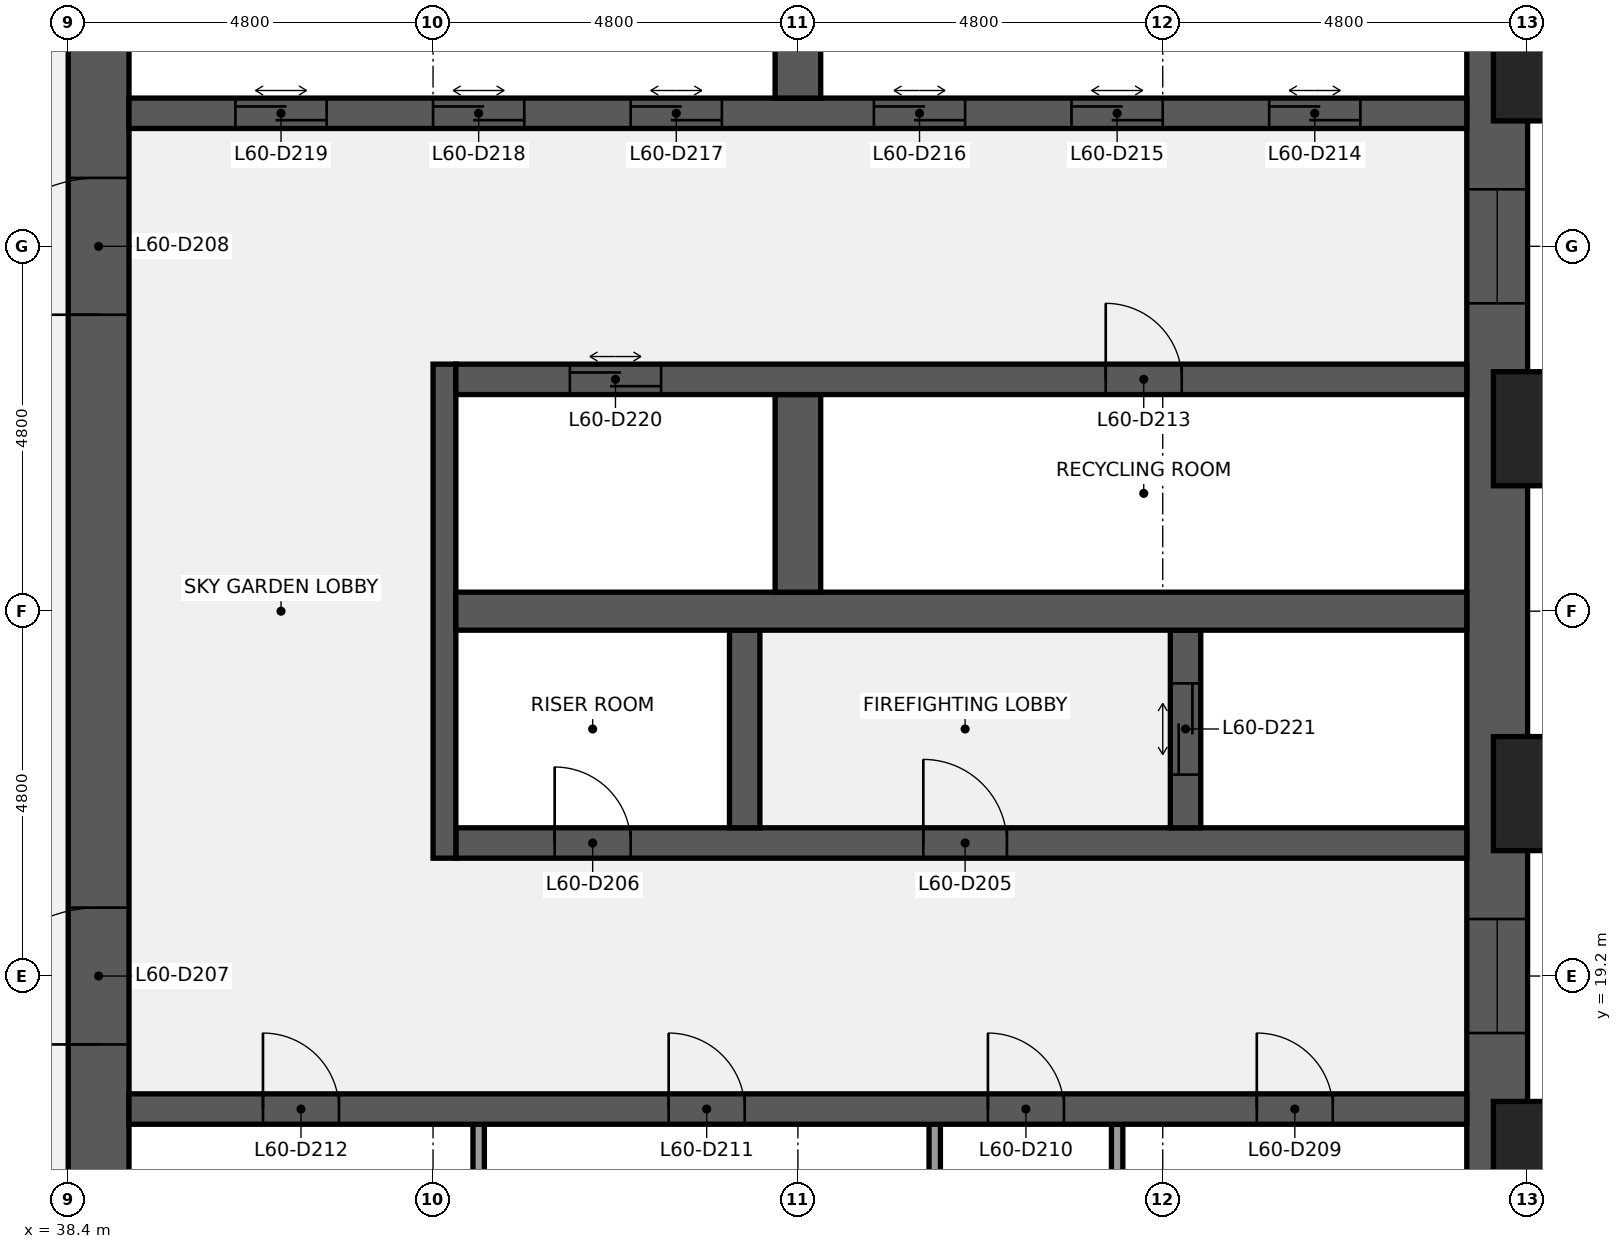
"""IFC4 building model, lengths in metres.
Left out: names, types, materials, properties, quantities, classifications, styles, units other than length and angle.
Written with IfcOpenShell. Run it as: python <this file> out.ifc"""

import sys

from ifc_helpers import new_model, si_unit, direction, frame, frame_2d, origin, origin_2d, place, context, subcontext, project, spatial, rectangle, extrude, element, fill, save


model = new_model("IFC4")
c1 = context("Model", 3, precision=1e-05, world=origin(), true_north=direction((0.0, 1.0)))
c2 = subcontext(c1, "Body", "Model", "MODEL_VIEW")
j1 = project(units=[si_unit("LENGTHUNIT", "METRE"), si_unit("PLANEANGLEUNIT", "RADIAN")], contexts=[c1])
p1 = place(None, origin())
s1 = spatial("IfcSite", under=j1, at=p1, CompositionType="ELEMENT")
p2 = place(p1, origin())
s2 = spatial("IfcBuilding", under=s1, at=p2, CompositionType="ELEMENT")
p3 = place(p2, frame((0.0, 0.0, 269.7)))
s3 = spatial("IfcBuildingStorey", under=s2, at=p3, CompositionType="ELEMENT", Elevation=269.7)
p4 = place(p3, frame((57.2, 38.4, 0.0), z_axis=(0.0, 0.0, 1.0), x_axis=(0.0, -1.0, 0.0)))
e1 = element("IfcWall", 1, at=p4, inside=s3, PredefinedType="SHEAR", context=c2, shape_type="SweptSolid", body=[
    extrude(rectangle(XDim=28.8, YDim=0.8, at=frame_2d((14.4, 0.0))), origin(), (0.0, 0.0, 1.0), 12.3),
])
p5 = place(p4, frame((18.45, 0.0, 0.9)))
e2 = element("IfcOpeningElement", 2, at=p5, cuts=e1, PredefinedType="OPENING", context=c2, shape_type="SweptSolid", body=[
    extrude(rectangle(XDim=1.5, YDim=6.3, at=frame_2d((0.75, 3.15))), frame((0.0, 0.41, 0.0), z_axis=(0.0, -1.0, 0.0), x_axis=(1.0, 0.0, 0.0)), (0.0, 0.0, 1.0), 0.82),
])
p6 = place(p4, frame((8.85, 0.0, 0.9)))
e3 = element("IfcOpeningElement", 3, at=p6, cuts=e1, PredefinedType="OPENING", context=c2, shape_type="SweptSolid", body=[
    extrude(rectangle(XDim=1.5, YDim=6.3, at=frame_2d((0.75, 3.15))), frame((0.0, 0.41, 0.0), z_axis=(0.0, -1.0, 0.0), x_axis=(1.0, 0.0, 0.0)), (0.0, 0.0, 1.0), 0.82),
])
p7 = place(p3, frame((38.8, 9.6, 0.0), z_axis=(0.0, 0.0, 1.0), x_axis=(0.0, 1.0, 0.0)))
e4 = element("IfcWall", 4, at=p7, inside=s3, PredefinedType="SHEAR", context=c2, shape_type="SweptSolid", body=[
    extrude(rectangle(XDim=28.8, YDim=0.8, at=frame_2d((14.4, 0.0))), origin(), (0.0, 0.0, 1.0), 12.3),
])
p8 = place(p7, frame((8.7, 0.0, 0.0)))
e5 = element("IfcOpeningElement", 5, at=p8, cuts=e4, PredefinedType="OPENING", context=c2, shape_type="SweptSolid", body=[
    extrude(rectangle(XDim=1.8, YDim=2.1, at=frame_2d((0.9, 1.05))), frame((0.0, 0.41, 0.0), z_axis=(0.0, -1.0, 0.0), x_axis=(1.0, 0.0, 0.0)), (0.0, 0.0, 1.0), 0.82),
])
p9 = place(p7, frame((18.3, 0.0, 0.0)))
e6 = element("IfcOpeningElement", 6, at=p9, cuts=e4, PredefinedType="OPENING", context=c2, shape_type="SweptSolid", body=[
    extrude(rectangle(XDim=1.8, YDim=2.1, at=frame_2d((0.9, 1.05))), frame((0.0, 0.41, 0.0), z_axis=(0.0, -1.0, 0.0), x_axis=(1.0, 0.0, 0.0)), (0.0, 0.0, 1.0), 0.82),
])
for number, where, z_axis, x_axis in (
    (7, (52.2, 14.65, 0.0), (0.0, 0.0, 1.0), (0.0, 1.0, 0.0)),
    (8, (49.8, 14.65, 0.0), (0.0, 0.0, 1.0), (0.0, 1.0, 0.0)),
    (9, (43.8, 14.65, 0.0), (0.0, 0.0, 1.0), (0.0, 1.0, 0.0)),
):
    element("IfcWall", number, at=place(p3, frame(where, z_axis=z_axis, x_axis=x_axis)), inside=s3, PredefinedType="PARTITIONING", context=c2, shape_type="SweptSolid", body=[
        extrude(rectangle(XDim=2.6, YDim=0.15, at=frame_2d((1.3, 0.0))), origin(), (0.0, 0.0, 1.0), 12.3),
    ])
p10 = place(p3, frame((39.2, 17.45, 0.0), z_axis=(0.0, 0.0, 1.0), x_axis=(1.0, 0.0, 0.0)))
e10 = element("IfcWall", 10, at=p10, inside=s3, PredefinedType="SHEAR", context=c2, shape_type="SweptSolid", body=[
    extrude(rectangle(XDim=17.6, YDim=0.4, at=frame_2d((8.8, 0.0))), origin(), (0.0, 0.0, 1.0), 12.3),
])
p11 = place(p10, frame((14.837, 0.0, 0.0)))
e11 = element("IfcOpeningElement", 11, at=p11, cuts=e10, PredefinedType="OPENING", context=c2, shape_type="SweptSolid", body=[
    extrude(rectangle(XDim=1.0, YDim=2.1, at=frame_2d((0.5, 1.05))), frame((0.0, 0.21, 0.0), z_axis=(0.0, -1.0, 0.0), x_axis=(1.0, 0.0, 0.0)), (0.0, 0.0, 1.0), 0.42),
])
p12 = place(p10, frame((11.3, 0.0, 0.0)))
e12 = element("IfcOpeningElement", 12, at=p12, cuts=e10, PredefinedType="OPENING", context=c2, shape_type="SweptSolid", body=[
    extrude(rectangle(XDim=1.0, YDim=2.1, at=frame_2d((0.5, 1.05))), frame((0.0, 0.21, 0.0), z_axis=(0.0, -1.0, 0.0), x_axis=(1.0, 0.0, 0.0)), (0.0, 0.0, 1.0), 0.42),
])
p13 = place(p10, frame((7.1, 0.0, 0.0)))
e13 = element("IfcOpeningElement", 13, at=p13, cuts=e10, PredefinedType="OPENING", context=c2, shape_type="SweptSolid", body=[
    extrude(rectangle(XDim=1.0, YDim=2.1, at=frame_2d((0.5, 1.05))), frame((0.0, 0.21, 0.0), z_axis=(0.0, -1.0, 0.0), x_axis=(1.0, 0.0, 0.0)), (0.0, 0.0, 1.0), 0.42),
])
p14 = place(p10, frame((1.762, 0.0, 0.0)))
e14 = element("IfcOpeningElement", 14, at=p14, cuts=e10, PredefinedType="OPENING", context=c2, shape_type="SweptSolid", body=[
    extrude(rectangle(XDim=1.0, YDim=2.1, at=frame_2d((0.5, 1.05))), frame((0.0, 0.21, 0.0), z_axis=(0.0, -1.0, 0.0), x_axis=(1.0, 0.0, 0.0)), (0.0, 0.0, 1.0), 0.42),
])
p15 = place(p3, frame((43.5, 20.95, 0.0), z_axis=(0.0, 0.0, 1.0), x_axis=(1.0, 0.0, 0.0)))
e15 = element("IfcWall", 15, at=p15, inside=s3, PredefinedType="SHEAR", context=c2, shape_type="SweptSolid", body=[
    extrude(rectangle(XDim=13.3, YDim=0.4, at=frame_2d((6.65, 0.0))), origin(), (0.0, 0.0, 1.0), 12.3),
])
p16 = place(p15, frame((6.15, 0.0, 0.0)))
e16 = element("IfcOpeningElement", 16, at=p16, cuts=e15, PredefinedType="OPENING", context=c2, shape_type="SweptSolid", body=[
    extrude(rectangle(XDim=1.1, YDim=2.1, at=frame_2d((0.55, 1.05))), frame((0.0, 0.21, 0.0), z_axis=(0.0, -1.0, 0.0), x_axis=(1.0, 0.0, 0.0)), (0.0, 0.0, 1.0), 0.42),
])
p17 = place(p15, frame((1.3, 0.0, 0.0)))
e17 = element("IfcOpeningElement", 17, at=p17, cuts=e15, PredefinedType="OPENING", context=c2, shape_type="SweptSolid", body=[
    extrude(rectangle(XDim=1.0, YDim=2.1, at=frame_2d((0.5, 1.05))), frame((0.0, 0.21, 0.0), z_axis=(0.0, -1.0, 0.0), x_axis=(1.0, 0.0, 0.0)), (0.0, 0.0, 1.0), 0.42),
])
p18 = place(p3, frame((43.35, 20.75, 0.0), z_axis=(0.0, 0.0, 1.0), x_axis=(0.0, 1.0, 0.0)))
e18 = element("IfcWall", 18, at=p18, inside=s3, PredefinedType="SHEAR", context=c2, shape_type="SweptSolid", body=[
    extrude(rectangle(XDim=6.5, YDim=0.3, at=frame_2d((3.25, 0.0))), origin(), (0.0, 0.0, 1.0), 12.3),
])
p19 = place(p3, frame((53.1, 21.15, 0.0), z_axis=(0.0, 0.0, 1.0), x_axis=(0.0, 1.0, 0.0)))
e19 = element("IfcWall", 19, at=p19, inside=s3, PredefinedType="SHEAR", context=c2, shape_type="SweptSolid", body=[
    extrude(rectangle(XDim=2.6, YDim=0.4, at=frame_2d((1.3, 0.0))), origin(), (0.0, 0.0, 1.0), 12.3),
])
p20 = place(p19, frame((0.7, 0.0, 0.0)))
e20 = element("IfcOpeningElement", 20, at=p20, cuts=e19, PredefinedType="OPENING", context=c2, shape_type="SweptSolid", body=[
    extrude(rectangle(XDim=1.2, YDim=2.1, at=frame_2d((0.6, 1.05))), frame((0.0, 0.21, 0.0), z_axis=(0.0, -1.0, 0.0), x_axis=(1.0, 0.0, 0.0)), (0.0, 0.0, 1.0), 0.42),
])
p21 = place(p3, frame((47.3, 21.15, 0.0), z_axis=(0.0, 0.0, 1.0), x_axis=(0.0, 1.0, 0.0)))
e21 = element("IfcWall", 21, at=p21, inside=s3, PredefinedType="SHEAR", context=c2, shape_type="SweptSolid", body=[
    extrude(rectangle(XDim=2.6, YDim=0.4, at=frame_2d((1.3, 0.0))), origin(), (0.0, 0.0, 1.0), 12.3),
])
p22 = place(p3, frame((43.5, 24.0, 0.0), z_axis=(0.0, 0.0, 1.0), x_axis=(1.0, 0.0, 0.0)))
e22 = element("IfcWall", 22, at=p22, inside=s3, PredefinedType="SHEAR", context=c2, shape_type="SweptSolid", body=[
    extrude(rectangle(XDim=13.3, YDim=0.5, at=frame_2d((6.65, 0.0))), origin(), (0.0, 0.0, 1.0), 12.3),
])
p23 = place(p3, frame((48.0, 24.25, 0.0), z_axis=(0.0, 0.0, 1.0), x_axis=(0.0, 1.0, 0.0)))
e23 = element("IfcWall", 23, at=p23, inside=s3, PredefinedType="SHEAR", context=c2, shape_type="SweptSolid", body=[
    extrude(rectangle(XDim=2.6, YDim=0.6, at=frame_2d((1.3, 0.0))), origin(), (0.0, 0.0, 1.0), 12.3),
])
p24 = place(p3, frame((43.5, 27.05, 0.0), z_axis=(0.0, 0.0, 1.0), x_axis=(1.0, 0.0, 0.0)))
e24 = element("IfcWall", 24, at=p24, inside=s3, PredefinedType="SHEAR", context=c2, shape_type="SweptSolid", body=[
    extrude(rectangle(XDim=13.3, YDim=0.4, at=frame_2d((6.65, 0.0))), origin(), (0.0, 0.0, 1.0), 12.3),
])
p25 = place(p24, frame((8.55, 0.0, 0.0)))
e25 = element("IfcOpeningElement", 25, at=p25, cuts=e24, PredefinedType="OPENING", context=c2, shape_type="SweptSolid", body=[
    extrude(rectangle(XDim=1.0, YDim=2.1, at=frame_2d((0.5, 1.05))), frame((0.0, 0.21, 0.0), z_axis=(0.0, -1.0, 0.0), x_axis=(1.0, 0.0, 0.0)), (0.0, 0.0, 1.0), 0.42),
])
p26 = place(p24, frame((1.5, 0.0, 0.0)))
e26 = element("IfcOpeningElement", 26, at=p26, cuts=e24, PredefinedType="OPENING", context=c2, shape_type="SweptSolid", body=[
    extrude(rectangle(XDim=1.2, YDim=2.1, at=frame_2d((0.6, 1.05))), frame((0.0, 0.21, 0.0), z_axis=(0.0, -1.0, 0.0), x_axis=(1.0, 0.0, 0.0)), (0.0, 0.0, 1.0), 0.42),
])
p27 = place(p3, frame((39.2, 30.55, 0.0), z_axis=(0.0, 0.0, 1.0), x_axis=(1.0, 0.0, 0.0)))
e27 = element("IfcWall", 27, at=p27, inside=s3, PredefinedType="SHEAR", context=c2, shape_type="SweptSolid", body=[
    extrude(rectangle(XDim=17.6, YDim=0.4, at=frame_2d((8.8, 0.0))), origin(), (0.0, 0.0, 1.0), 12.3),
])
p28 = place(p27, frame((15.0, 0.0, 0.0)))
e28 = element("IfcOpeningElement", 28, at=p28, cuts=e27, PredefinedType="OPENING", context=c2, shape_type="SweptSolid", body=[
    extrude(rectangle(XDim=1.2, YDim=2.1, at=frame_2d((0.6, 1.05))), frame((0.0, 0.21, 0.0), z_axis=(0.0, -1.0, 0.0), x_axis=(1.0, 0.0, 0.0)), (0.0, 0.0, 1.0), 0.42),
])
p29 = place(p27, frame((12.4, 0.0, 0.0)))
e29 = element("IfcOpeningElement", 29, at=p29, cuts=e27, PredefinedType="OPENING", context=c2, shape_type="SweptSolid", body=[
    extrude(rectangle(XDim=1.2, YDim=2.1, at=frame_2d((0.6, 1.05))), frame((0.0, 0.21, 0.0), z_axis=(0.0, -1.0, 0.0), x_axis=(1.0, 0.0, 0.0)), (0.0, 0.0, 1.0), 0.42),
])
p30 = place(p27, frame((9.8, 0.0, 0.0)))
e30 = element("IfcOpeningElement", 30, at=p30, cuts=e27, PredefinedType="OPENING", context=c2, shape_type="SweptSolid", body=[
    extrude(rectangle(XDim=1.2, YDim=2.1, at=frame_2d((0.6, 1.05))), frame((0.0, 0.21, 0.0), z_axis=(0.0, -1.0, 0.0), x_axis=(1.0, 0.0, 0.0)), (0.0, 0.0, 1.0), 0.42),
])
p31 = place(p27, frame((6.6, 0.0, 0.0)))
e31 = element("IfcOpeningElement", 31, at=p31, cuts=e27, PredefinedType="OPENING", context=c2, shape_type="SweptSolid", body=[
    extrude(rectangle(XDim=1.2, YDim=2.1, at=frame_2d((0.6, 1.05))), frame((0.0, 0.21, 0.0), z_axis=(0.0, -1.0, 0.0), x_axis=(1.0, 0.0, 0.0)), (0.0, 0.0, 1.0), 0.42),
])
p32 = place(p27, frame((4.0, 0.0, 0.0)))
e32 = element("IfcOpeningElement", 32, at=p32, cuts=e27, PredefinedType="OPENING", context=c2, shape_type="SweptSolid", body=[
    extrude(rectangle(XDim=1.2, YDim=2.1, at=frame_2d((0.6, 1.05))), frame((0.0, 0.21, 0.0), z_axis=(0.0, -1.0, 0.0), x_axis=(1.0, 0.0, 0.0)), (0.0, 0.0, 1.0), 0.42),
])
p33 = place(p27, frame((1.4, 0.0, 0.0)))
e33 = element("IfcOpeningElement", 33, at=p33, cuts=e27, PredefinedType="OPENING", context=c2, shape_type="SweptSolid", body=[
    extrude(rectangle(XDim=1.2, YDim=2.1, at=frame_2d((0.6, 1.05))), frame((0.0, 0.21, 0.0), z_axis=(0.0, -1.0, 0.0), x_axis=(1.0, 0.0, 0.0)), (0.0, 0.0, 1.0), 0.42),
])
p34 = place(p3, frame((48.0, 30.75, 0.0), z_axis=(0.0, 0.0, 1.0), x_axis=(0.0, 1.0, 0.0)))
e34 = element("IfcWall", 34, at=p34, inside=s3, PredefinedType="SHEAR", context=c2, shape_type="SweptSolid", body=[
    extrude(rectangle(XDim=2.6, YDim=0.6, at=frame_2d((1.3, 0.0))), origin(), (0.0, 0.0, 1.0), 12.3),
])
for number, where, z_axis, x_axis in (
    (35, (58.35, 16.8, 0.0), (0.0, 0.0, 1.0), (0.0, 1.0, 0.0)),
    (36, (58.35, 21.6, 0.0), (0.0, 0.0, 1.0), (0.0, 1.0, 0.0)),
    (37, (58.35, 26.4, 0.0), (0.0, 0.0, 1.0), (0.0, 1.0, 0.0)),
    (38, (58.35, 31.2, 0.0), (0.0, 0.0, 1.0), (0.0, 1.0, 0.0)),
):
    element("IfcColumn", number, at=place(p3, frame(where, z_axis=z_axis, x_axis=x_axis)), inside=s3, PredefinedType="PILASTER", context=c2, shape_type="SweptSolid", body=[
        extrude(rectangle(XDim=2.4, YDim=1.5, at=origin_2d()), origin(), (0.0, 0.0, 1.0), 12.6),
    ])
p35 = place(p16, origin())
e39 = element("IfcDoor", 39, at=p35, inside=s3, OperationType="SINGLE_SWING_LEFT", PredefinedType="DOOR", context=c2, shape_type="SweptSolid", body=[
    extrude(rectangle(XDim=1.1, YDim=2.1, at=frame_2d((0.55, 1.05))), frame((0.0, 0.025, 0.0), z_axis=(0.0, -1.0, 0.0), x_axis=(1.0, 0.0, 0.0)), (0.0, 0.0, 1.0), 0.05),
])
fill(e16, e39)
p36 = place(p17, origin())
e40 = element("IfcDoor", 40, at=p36, inside=s3, OperationType="SINGLE_SWING_LEFT", PredefinedType="DOOR", context=c2, shape_type="SweptSolid", body=[
    extrude(rectangle(XDim=1.0, YDim=2.1, at=frame_2d((0.5, 1.05))), frame((0.0, 0.025, 0.0), z_axis=(0.0, -1.0, 0.0), x_axis=(1.0, 0.0, 0.0)), (0.0, 0.0, 1.0), 0.05),
])
fill(e17, e40)
p37 = place(p8, origin())
e41 = element("IfcDoor", 41, at=p37, inside=s3, OperationType="DOUBLE_DOOR_SINGLE_SWING", PredefinedType="DOOR", context=c2, shape_type="SweptSolid", body=[
    extrude(rectangle(XDim=1.8, YDim=2.1, at=frame_2d((0.9, 1.05))), frame((0.0, 0.025, 0.0), z_axis=(0.0, -1.0, 0.0), x_axis=(1.0, 0.0, 0.0)), (0.0, 0.0, 1.0), 0.05),
])
fill(e5, e41)
p38 = place(p9, origin())
e42 = element("IfcDoor", 42, at=p38, inside=s3, OperationType="DOUBLE_DOOR_SINGLE_SWING", PredefinedType="DOOR", context=c2, shape_type="SweptSolid", body=[
    extrude(rectangle(XDim=1.8, YDim=2.1, at=frame_2d((0.9, 1.05))), frame((0.0, 0.025, 0.0), z_axis=(0.0, -1.0, 0.0), x_axis=(1.0, 0.0, 0.0)), (0.0, 0.0, 1.0), 0.05),
])
fill(e6, e42)
p39 = place(p11, origin())
e43 = element("IfcDoor", 43, at=p39, inside=s3, OperationType="SINGLE_SWING_LEFT", PredefinedType="DOOR", context=c2, shape_type="SweptSolid", body=[
    extrude(rectangle(XDim=1.0, YDim=2.1, at=frame_2d((0.5, 1.05))), frame((0.0, 0.025, 0.0), z_axis=(0.0, -1.0, 0.0), x_axis=(1.0, 0.0, 0.0)), (0.0, 0.0, 1.0), 0.05),
])
fill(e11, e43)
p40 = place(p12, origin())
e44 = element("IfcDoor", 44, at=p40, inside=s3, OperationType="SINGLE_SWING_LEFT", PredefinedType="DOOR", context=c2, shape_type="SweptSolid", body=[
    extrude(rectangle(XDim=1.0, YDim=2.1, at=frame_2d((0.5, 1.05))), frame((0.0, 0.025, 0.0), z_axis=(0.0, -1.0, 0.0), x_axis=(1.0, 0.0, 0.0)), (0.0, 0.0, 1.0), 0.05),
])
fill(e12, e44)
p41 = place(p13, origin())
e45 = element("IfcDoor", 45, at=p41, inside=s3, OperationType="SINGLE_SWING_LEFT", PredefinedType="DOOR", context=c2, shape_type="SweptSolid", body=[
    extrude(rectangle(XDim=1.0, YDim=2.1, at=frame_2d((0.5, 1.05))), frame((0.0, 0.025, 0.0), z_axis=(0.0, -1.0, 0.0), x_axis=(1.0, 0.0, 0.0)), (0.0, 0.0, 1.0), 0.05),
])
fill(e13, e45)
p42 = place(p14, origin())
e46 = element("IfcDoor", 46, at=p42, inside=s3, OperationType="SINGLE_SWING_LEFT", PredefinedType="DOOR", context=c2, shape_type="SweptSolid", body=[
    extrude(rectangle(XDim=1.0, YDim=2.1, at=frame_2d((0.5, 1.05))), frame((0.0, 0.025, 0.0), z_axis=(0.0, -1.0, 0.0), x_axis=(1.0, 0.0, 0.0)), (0.0, 0.0, 1.0), 0.05),
])
fill(e14, e46)
p43 = place(p25, origin())
e47 = element("IfcDoor", 47, at=p43, inside=s3, OperationType="SINGLE_SWING_LEFT", PredefinedType="DOOR", context=c2, shape_type="SweptSolid", body=[
    extrude(rectangle(XDim=1.0, YDim=2.1, at=frame_2d((0.5, 1.05))), frame((0.0, 0.025, 0.0), z_axis=(0.0, -1.0, 0.0), x_axis=(1.0, 0.0, 0.0)), (0.0, 0.0, 1.0), 0.05),
])
fill(e25, e47)
p44 = place(p28, origin())
e48 = element("IfcDoor", 48, at=p44, inside=s3, OperationType="DOUBLE_DOOR_SLIDING", PredefinedType="DOOR", context=c2, shape_type="SweptSolid", body=[
    extrude(rectangle(XDim=1.2, YDim=2.1, at=frame_2d((0.6, 1.05))), frame((0.0, 0.025, 0.0), z_axis=(0.0, -1.0, 0.0), x_axis=(1.0, 0.0, 0.0)), (0.0, 0.0, 1.0), 0.05),
])
fill(e28, e48)
p45 = place(p29, origin())
e49 = element("IfcDoor", 49, at=p45, inside=s3, OperationType="DOUBLE_DOOR_SLIDING", PredefinedType="DOOR", context=c2, shape_type="SweptSolid", body=[
    extrude(rectangle(XDim=1.2, YDim=2.1, at=frame_2d((0.6, 1.05))), frame((0.0, 0.025, 0.0), z_axis=(0.0, -1.0, 0.0), x_axis=(1.0, 0.0, 0.0)), (0.0, 0.0, 1.0), 0.05),
])
fill(e29, e49)
p46 = place(p30, origin())
e50 = element("IfcDoor", 50, at=p46, inside=s3, OperationType="DOUBLE_DOOR_SLIDING", PredefinedType="DOOR", context=c2, shape_type="SweptSolid", body=[
    extrude(rectangle(XDim=1.2, YDim=2.1, at=frame_2d((0.6, 1.05))), frame((0.0, 0.025, 0.0), z_axis=(0.0, -1.0, 0.0), x_axis=(1.0, 0.0, 0.0)), (0.0, 0.0, 1.0), 0.05),
])
fill(e30, e50)
p47 = place(p31, origin())
e51 = element("IfcDoor", 51, at=p47, inside=s3, OperationType="DOUBLE_DOOR_SLIDING", PredefinedType="DOOR", context=c2, shape_type="SweptSolid", body=[
    extrude(rectangle(XDim=1.2, YDim=2.1, at=frame_2d((0.6, 1.05))), frame((0.0, 0.025, 0.0), z_axis=(0.0, -1.0, 0.0), x_axis=(1.0, 0.0, 0.0)), (0.0, 0.0, 1.0), 0.05),
])
fill(e31, e51)
p48 = place(p32, origin())
e52 = element("IfcDoor", 52, at=p48, inside=s3, OperationType="DOUBLE_DOOR_SLIDING", PredefinedType="DOOR", context=c2, shape_type="SweptSolid", body=[
    extrude(rectangle(XDim=1.2, YDim=2.1, at=frame_2d((0.6, 1.05))), frame((0.0, 0.025, 0.0), z_axis=(0.0, -1.0, 0.0), x_axis=(1.0, 0.0, 0.0)), (0.0, 0.0, 1.0), 0.05),
])
fill(e32, e52)
p49 = place(p33, origin())
e53 = element("IfcDoor", 53, at=p49, inside=s3, OperationType="DOUBLE_DOOR_SLIDING", PredefinedType="DOOR", context=c2, shape_type="SweptSolid", body=[
    extrude(rectangle(XDim=1.2, YDim=2.1, at=frame_2d((0.6, 1.05))), frame((0.0, 0.025, 0.0), z_axis=(0.0, -1.0, 0.0), x_axis=(1.0, 0.0, 0.0)), (0.0, 0.0, 1.0), 0.05),
])
fill(e33, e53)
p50 = place(p26, origin())
e54 = element("IfcDoor", 54, at=p50, inside=s3, OperationType="DOUBLE_DOOR_SLIDING", PredefinedType="DOOR", context=c2, shape_type="SweptSolid", body=[
    extrude(rectangle(XDim=1.2, YDim=2.1, at=frame_2d((0.6, 1.05))), frame((0.0, 0.025, 0.0), z_axis=(0.0, -1.0, 0.0), x_axis=(1.0, 0.0, 0.0)), (0.0, 0.0, 1.0), 0.05),
])
fill(e26, e54)
p51 = place(p20, origin())
e55 = element("IfcDoor", 55, at=p51, inside=s3, OperationType="DOUBLE_DOOR_SLIDING", PredefinedType="DOOR", context=c2, shape_type="SweptSolid", body=[
    extrude(rectangle(XDim=1.2, YDim=2.1, at=frame_2d((0.6, 1.05))), frame((0.0, 0.025, 0.0), z_axis=(0.0, -1.0, 0.0), x_axis=(1.0, 0.0, 0.0)), (0.0, 0.0, 1.0), 0.05),
])
fill(e20, e55)
p52 = place(p5, origin())
e56 = element("IfcWindow", 56, at=p52, inside=s3, PartitioningType="SINGLE_PANEL", PredefinedType="WINDOW", context=c2, shape_type="SweptSolid", body=[
    extrude(rectangle(XDim=1.5, YDim=6.3, at=frame_2d((0.75, 3.15))), frame((0.0, 0.03, 0.0), z_axis=(0.0, -1.0, 0.0), x_axis=(1.0, 0.0, 0.0)), (0.0, 0.0, 1.0), 0.06),
])
fill(e2, e56)
p53 = place(p6, origin())
e57 = element("IfcWindow", 57, at=p53, inside=s3, PartitioningType="SINGLE_PANEL", PredefinedType="WINDOW", context=c2, shape_type="SweptSolid", body=[
    extrude(rectangle(XDim=1.5, YDim=6.3, at=frame_2d((0.75, 3.15))), frame((0.0, 0.03, 0.0), z_axis=(0.0, -1.0, 0.0), x_axis=(1.0, 0.0, 0.0)), (0.0, 0.0, 1.0), 0.06),
])
fill(e3, e57)
save(model, sys.argv[1])
